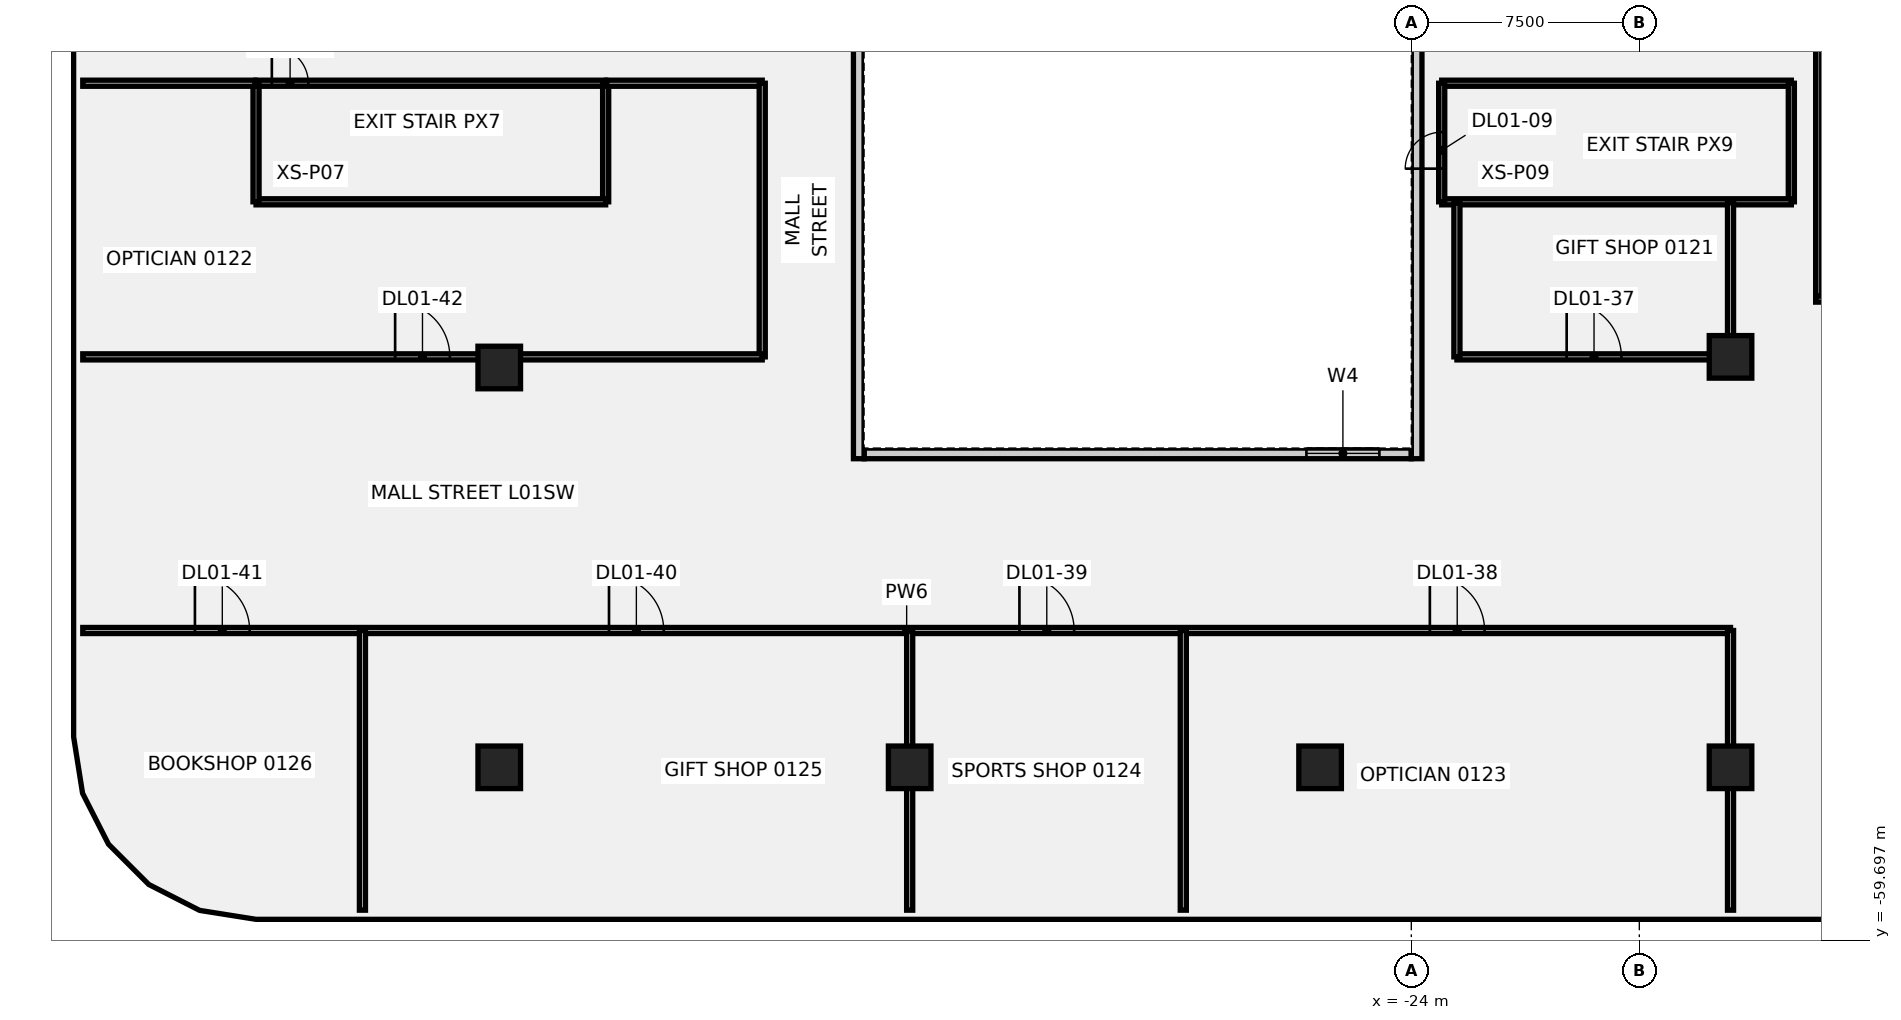
"""IFC4 building model, lengths in metres.
Left out: names, types, materials, properties, quantities, classifications, styles, units other than length and angle.
Written with IfcOpenShell. Run it as: python <this file> out.ifc"""

import sys

from ifc_helpers import new_model, si_unit, direction, frame, frame_2d, origin, origin_2d, place, context, subcontext, project, spatial, rectangle, extrude, element, fill, save


model = new_model("IFC4")
c1 = context("Model", 3, precision=1e-05, world=origin(), true_north=direction((0.0, 1.0)))
c2 = subcontext(c1, "Body", "Model", "MODEL_VIEW")
j1 = project(units=[si_unit("LENGTHUNIT", "METRE"), si_unit("PLANEANGLEUNIT", "RADIAN")], contexts=[c1])
p1 = place(None, origin())
s1 = spatial("IfcSite", under=j1, at=p1, CompositionType="ELEMENT")
p2 = place(p1, origin())
s2 = spatial("IfcBuilding", under=s1, at=p2, CompositionType="ELEMENT")
p3 = place(p2, frame((0.0, 0.0, 9.0)))
s3 = spatial("IfcBuildingStorey", under=s2, at=p3, CompositionType="ELEMENT", Elevation=9.0)
for number, where, z_axis, x_axis in (
    (1, (-54.0, -54.0, -0.5), (0.0, 0.0, 1.0), (1.0, 0.0, 0.0)),
    (2, (-54.0, -40.85, -0.5), (0.0, 0.0, 1.0), (1.0, 0.0, 0.0)),
    (3, (-40.5, -54.0, -0.5), (0.0, 0.0, 1.0), (1.0, 0.0, 0.0)),
    (4, (-27.0, -54.0, -0.5), (0.0, 0.0, 1.0), (1.0, 0.0, 0.0)),
    (5, (-13.5, -54.0, -0.5), (0.0, 0.0, 1.0), (1.0, 0.0, 0.0)),
    (6, (-13.5, -40.5, -0.5), (0.0, 0.0, 1.0), (1.0, 0.0, 0.0)),
):
    element("IfcColumn", number, at=place(p3, frame(where, z_axis=z_axis, x_axis=x_axis)), inside=s3, PredefinedType="COLUMN", context=c2, shape_type="SweptSolid", body=[
        extrude(rectangle(XDim=1.4, YDim=1.4, at=origin_2d()), origin(), (0.0, 0.0, 1.0), 6.0),
    ])
p4 = place(p3, frame((-62.0, -31.5, 0.0), z_axis=(0.0, 0.0, 1.0), x_axis=(1.0, 0.0, 0.0)))
e7 = element("IfcWall", 7, at=p4, inside=s3, PredefinedType="PARTITIONING", context=c2, shape_type="SweptSolid", body=[
    extrude(rectangle(XDim=11.5, YDim=0.2, at=frame_2d((5.75, 0.0))), origin(), (0.0, 0.0, 1.0), 5.5),
])
p5 = place(p4, frame((0.52, 0.0, 0.0)))
e8 = element("IfcOpeningElement", 8, at=p5, cuts=e7, PredefinedType="OPENING", context=c2, shape_type="SweptSolid", body=[
    extrude(rectangle(XDim=1.2, YDim=2.1, at=frame_2d((0.6, 1.05))), frame((0.0, 0.11, 0.0), z_axis=(0.0, -1.0, 0.0), x_axis=(1.0, 0.0, 0.0)), (0.0, 0.0, 1.0), 0.22),
])
p6 = place(p3, frame((-50.5, -35.4, 0.0), z_axis=(0.0, 0.0, 1.0), x_axis=(0.0, 1.0, 0.0)))
e9 = element("IfcWall", 9, at=p6, inside=s3, PredefinedType="PARTITIONING", context=c2, shape_type="SweptSolid", body=[
    extrude(rectangle(XDim=3.9, YDim=0.2, at=frame_2d((1.95, 0.0))), origin(), (0.0, 0.0, 1.0), 5.5),
])
p7 = place(p3, frame((-62.0, -35.4, 0.0), z_axis=(0.0, 0.0, 1.0), x_axis=(1.0, 0.0, 0.0)))
e10 = element("IfcWall", 10, at=p7, inside=s3, PredefinedType="PARTITIONING", context=c2, shape_type="SweptSolid", body=[
    extrude(rectangle(XDim=11.5, YDim=0.2, at=frame_2d((5.75, 0.0))), origin(), (0.0, 0.0, 1.0), 5.5),
])
p8 = place(p3, frame((-62.0, -35.4, 0.0), z_axis=(0.0, 0.0, 1.0), x_axis=(0.0, 1.0, 0.0)))
e11 = element("IfcWall", 11, at=p8, inside=s3, PredefinedType="PARTITIONING", context=c2, shape_type="SweptSolid", body=[
    extrude(rectangle(XDim=3.9, YDim=0.2, at=frame_2d((1.95, 0.0))), origin(), (0.0, 0.0, 1.0), 5.5),
])
p9 = place(p3, frame((-23.0, -31.5, 0.0), z_axis=(0.0, 0.0, 1.0), x_axis=(1.0, 0.0, 0.0)))
e12 = element("IfcWall", 12, at=p9, inside=s3, PredefinedType="PARTITIONING", context=c2, shape_type="SweptSolid", body=[
    extrude(rectangle(XDim=11.5, YDim=0.2, at=frame_2d((5.75, 0.0))), origin(), (0.0, 0.0, 1.0), 5.5),
])
p10 = place(p3, frame((-11.5, -35.4, 0.0), z_axis=(0.0, 0.0, 1.0), x_axis=(0.0, 1.0, 0.0)))
e13 = element("IfcWall", 13, at=p10, inside=s3, PredefinedType="PARTITIONING", context=c2, shape_type="SweptSolid", body=[
    extrude(rectangle(XDim=3.9, YDim=0.2, at=frame_2d((1.95, 0.0))), origin(), (0.0, 0.0, 1.0), 5.5),
])
p11 = place(p3, frame((-23.0, -35.4, 0.0), z_axis=(0.0, 0.0, 1.0), x_axis=(1.0, 0.0, 0.0)))
e14 = element("IfcWall", 14, at=p11, inside=s3, PredefinedType="PARTITIONING", context=c2, shape_type="SweptSolid", body=[
    extrude(rectangle(XDim=11.5, YDim=0.2, at=frame_2d((5.75, 0.0))), origin(), (0.0, 0.0, 1.0), 5.5),
])
p12 = place(p3, frame((-23.0, -35.4, 0.0), z_axis=(0.0, 0.0, 1.0), x_axis=(0.0, 1.0, 0.0)))
e15 = element("IfcWall", 15, at=p12, inside=s3, PredefinedType="PARTITIONING", context=c2, shape_type="SweptSolid", body=[
    extrude(rectangle(XDim=3.9, YDim=0.2, at=frame_2d((1.95, 0.0))), origin(), (0.0, 0.0, 1.0), 5.5),
])
p13 = place(p12, frame((1.09, 0.0, 0.0)))
e16 = element("IfcOpeningElement", 16, at=p13, cuts=e15, PredefinedType="OPENING", context=c2, shape_type="SweptSolid", body=[
    extrude(rectangle(XDim=1.2, YDim=2.1, at=frame_2d((0.6, 1.05))), frame((0.0, 0.11, 0.0), z_axis=(0.0, -1.0, 0.0), x_axis=(1.0, 0.0, 0.0)), (0.0, 0.0, 1.0), 0.22),
])
p14 = place(p3, frame((-67.699, -49.5, 0.0), z_axis=(0.0, 0.0, 1.0), x_axis=(1.0, 0.0, 0.0)))
e17 = element("IfcWall", 17, at=p14, inside=s3, PredefinedType="PARTITIONING", context=c2, shape_type="SweptSolid", body=[
    extrude(rectangle(XDim=54.199, YDim=0.2, at=frame_2d((27.1, 0.0))), origin(), (0.0, 0.0, 1.0), 5.5),
])
p15 = place(p14, frame((44.309, 0.0, 0.0)))
e18 = element("IfcOpeningElement", 18, at=p15, cuts=e17, PredefinedType="OPENING", context=c2, shape_type="SweptSolid", body=[
    extrude(rectangle(XDim=1.8, YDim=2.1, at=frame_2d((0.9, 1.05))), frame((0.0, 0.11, 0.0), z_axis=(0.0, -1.0, 0.0), x_axis=(1.0, 0.0, 0.0)), (0.0, 0.0, 1.0), 0.22),
])
p16 = place(p14, frame((30.809, 0.0, 0.0)))
e19 = element("IfcOpeningElement", 19, at=p16, cuts=e17, PredefinedType="OPENING", context=c2, shape_type="SweptSolid", body=[
    extrude(rectangle(XDim=1.8, YDim=2.1, at=frame_2d((0.9, 1.05))), frame((0.0, 0.11, 0.0), z_axis=(0.0, -1.0, 0.0), x_axis=(1.0, 0.0, 0.0)), (0.0, 0.0, 1.0), 0.22),
])
p17 = place(p14, frame((17.309, 0.0, 0.0)))
e20 = element("IfcOpeningElement", 20, at=p17, cuts=e17, PredefinedType="OPENING", context=c2, shape_type="SweptSolid", body=[
    extrude(rectangle(XDim=1.8, YDim=2.1, at=frame_2d((0.9, 1.05))), frame((0.0, 0.11, 0.0), z_axis=(0.0, -1.0, 0.0), x_axis=(1.0, 0.0, 0.0)), (0.0, 0.0, 1.0), 0.22),
])
p18 = place(p14, frame((3.689, 0.0, 0.0)))
e21 = element("IfcOpeningElement", 21, at=p18, cuts=e17, PredefinedType="OPENING", context=c2, shape_type="SweptSolid", body=[
    extrude(rectangle(XDim=1.8, YDim=2.1, at=frame_2d((0.9, 1.05))), frame((0.0, 0.11, 0.0), z_axis=(0.0, -1.0, 0.0), x_axis=(1.0, 0.0, 0.0)), (0.0, 0.0, 1.0), 0.22),
])
p19 = place(p3, frame((-50.47, -31.5, 0.0), z_axis=(0.0, 0.0, 1.0), x_axis=(1.0, 0.0, 0.0)))
e22 = element("IfcWall", 22, at=p19, inside=s3, PredefinedType="PARTITIONING", context=c2, shape_type="SweptSolid", body=[
    extrude(rectangle(XDim=5.12, YDim=0.2, at=frame_2d((2.56, 0.0))), origin(), (0.0, 0.0, 1.0), 5.5),
])
p20 = place(p3, frame((-45.35, -40.5, 0.0), z_axis=(0.0, 0.0, 1.0), x_axis=(0.0, 1.0, 0.0)))
e23 = element("IfcWall", 23, at=p20, inside=s3, PredefinedType="PARTITIONING", context=c2, shape_type="SweptSolid", body=[
    extrude(rectangle(XDim=9.0, YDim=0.2, at=frame_2d((4.5, 0.0))), origin(), (0.0, 0.0, 1.0), 5.5),
])
p21 = place(p3, frame((-67.699, -40.5, 0.0), z_axis=(0.0, 0.0, 1.0), x_axis=(1.0, 0.0, 0.0)))
e24 = element("IfcWall", 24, at=p21, inside=s3, PredefinedType="PARTITIONING", context=c2, shape_type="SweptSolid", body=[
    extrude(rectangle(XDim=22.349, YDim=0.2, at=frame_2d((11.174, 0.0))), origin(), (0.0, 0.0, 1.0), 5.5),
])
p22 = place(p21, frame((10.274, 0.0, 0.0)))
e25 = element("IfcOpeningElement", 25, at=p22, cuts=e24, PredefinedType="OPENING", context=c2, shape_type="SweptSolid", body=[
    extrude(rectangle(XDim=1.8, YDim=2.1, at=frame_2d((0.9, 1.05))), frame((0.0, 0.11, 0.0), z_axis=(0.0, -1.0, 0.0), x_axis=(1.0, 0.0, 0.0)), (0.0, 0.0, 1.0), 0.22),
])
p23 = place(p3, frame((-67.699, -31.5, 0.0), z_axis=(0.0, 0.0, 1.0), x_axis=(1.0, 0.0, 0.0)))
e26 = element("IfcWall", 26, at=p23, inside=s3, PredefinedType="PARTITIONING", context=c2, shape_type="SweptSolid", body=[
    extrude(rectangle(XDim=5.669, YDim=0.2, at=frame_2d((2.834, 0.0))), origin(), (0.0, 0.0, 1.0), 5.5),
])
for number, where, z_axis, x_axis in (
    (27, (-58.5, -58.699, 0.0), (0.0, 0.0, 1.0), (0.0, 1.0, 0.0)),
    (28, (-40.5, -58.699, 0.0), (0.0, 0.0, 1.0), (0.0, 1.0, 0.0)),
    (29, (-31.5, -58.699, 0.0), (0.0, 0.0, 1.0), (0.0, 1.0, 0.0)),
    (30, (-13.5, -58.699, 0.0), (0.0, 0.0, 1.0), (0.0, 1.0, 0.0)),
):
    element("IfcWall", number, at=place(p3, frame(where, z_axis=z_axis, x_axis=x_axis)), inside=s3, PredefinedType="PARTITIONING", context=c2, shape_type="SweptSolid", body=[
        extrude(rectangle(XDim=9.199, YDim=0.2, at=frame_2d((4.6, 0.0))), origin(), (0.0, 0.0, 1.0), 5.5),
    ])
p24 = place(p3, frame((-13.5, -40.5, 0.0), z_axis=(0.0, 0.0, 1.0), x_axis=(0.0, 1.0, 0.0)))
e31 = element("IfcWall", 31, at=p24, inside=s3, PredefinedType="PARTITIONING", context=c2, shape_type="SweptSolid", body=[
    extrude(rectangle(XDim=5.07, YDim=0.2, at=frame_2d((2.535, 0.0))), origin(), (0.0, 0.0, 1.0), 5.5),
])
p25 = place(p3, frame((-22.5, -40.5, 0.0), z_axis=(0.0, 0.0, 1.0), x_axis=(1.0, 0.0, 0.0)))
e32 = element("IfcWall", 32, at=p25, inside=s3, PredefinedType="PARTITIONING", context=c2, shape_type="SweptSolid", body=[
    extrude(rectangle(XDim=9.0, YDim=0.2, at=frame_2d((4.5, 0.0))), origin(), (0.0, 0.0, 1.0), 5.5),
])
p26 = place(p25, frame((3.61, 0.0, 0.0)))
e33 = element("IfcOpeningElement", 33, at=p26, cuts=e32, PredefinedType="OPENING", context=c2, shape_type="SweptSolid", body=[
    extrude(rectangle(XDim=1.8, YDim=2.1, at=frame_2d((0.9, 1.05))), frame((0.0, 0.11, 0.0), z_axis=(0.0, -1.0, 0.0), x_axis=(1.0, 0.0, 0.0)), (0.0, 0.0, 1.0), 0.22),
])
p27 = place(p3, frame((-22.5, -40.5, 0.0), z_axis=(0.0, 0.0, 1.0), x_axis=(0.0, 1.0, 0.0)))
e34 = element("IfcWall", 34, at=p27, inside=s3, PredefinedType="PARTITIONING", context=c2, shape_type="SweptSolid", body=[
    extrude(rectangle(XDim=5.07, YDim=0.2, at=frame_2d((2.535, 0.0))), origin(), (0.0, 0.0, 1.0), 5.5),
])
p28 = place(p3, frame((-10.6, -28.8, 0.0), z_axis=(0.0, 0.0, 1.0), x_axis=(0.0, -1.0, 0.0)))
e35 = element("IfcWall", 35, at=p28, inside=s3, PredefinedType="SOLIDWALL", context=c2, shape_type="SweptSolid", body=[
    extrude(rectangle(XDim=9.7, YDim=0.2, at=frame_2d((4.85, 0.0))), origin(), (0.0, 0.0, 1.0), 5.5),
])
p29 = place(p3, frame((-10.7, -38.6, 0.0), z_axis=(0.0, 0.0, 1.0), x_axis=(1.0, 0.0, 0.0)))
e36 = element("IfcWall", 36, at=p29, inside=s3, PredefinedType="SOLIDWALL", context=c2, shape_type="SweptSolid", body=[
    extrude(rectangle(XDim=4.3, YDim=0.2, at=frame_2d((2.15, 0.0))), origin(), (0.0, 0.0, 1.0), 5.5),
])
p30 = place(p3, frame((-42.0, -43.675, 0.0), z_axis=(0.0, 0.0, 1.0), x_axis=(1.0, 0.0, 0.0)))
e37 = element("IfcWall", 37, at=p30, inside=s3, PredefinedType="SOLIDWALL", context=c2, shape_type="SweptSolid", body=[
    extrude(rectangle(XDim=18.0, YDim=0.35, at=frame_2d((9.0, 0.0))), origin(), (0.0, 0.0, 1.0), 5.5),
])
p31 = place(p30, frame((14.55, 0.0, 1.0)))
e38 = element("IfcOpeningElement", 38, at=p31, cuts=e37, PredefinedType="OPENING", context=c2, shape_type="SweptSolid", body=[
    extrude(rectangle(XDim=2.4, YDim=1.8, at=frame_2d((1.2, 0.9))), frame((0.0, 0.185, 0.0), z_axis=(0.0, -1.0, 0.0), x_axis=(1.0, 0.0, 0.0)), (0.0, 0.0, 1.0), 0.37),
])
p32 = place(p3, frame((-42.175, -43.85, 0.0), z_axis=(0.0, 0.0, 1.0), x_axis=(0.0, 1.0, 0.0)))
e39 = element("IfcWall", 39, at=p32, inside=s3, PredefinedType="SOLIDWALL", context=c2, shape_type="SweptSolid", body=[
    extrude(rectangle(XDim=27.4, YDim=0.35, at=frame_2d((13.7, 0.0))), origin(), (0.0, 0.0, 1.0), 5.5),
])
p33 = place(p32, frame((14.9, 0.0, 1.0)))
e40 = element("IfcOpeningElement", 40, at=p33, cuts=e39, PredefinedType="OPENING", context=c2, shape_type="SweptSolid", body=[
    extrude(rectangle(XDim=2.4, YDim=1.8, at=frame_2d((1.2, 0.9))), frame((0.0, 0.185, 0.0), z_axis=(0.0, -1.0, 0.0), x_axis=(1.0, 0.0, 0.0)), (0.0, 0.0, 1.0), 0.37),
])
p34 = place(p3, frame((-23.825, -43.85, 0.0), z_axis=(0.0, 0.0, 1.0), x_axis=(0.0, 1.0, 0.0)))
e41 = element("IfcWall", 41, at=p34, inside=s3, PredefinedType="SOLIDWALL", context=c2, shape_type="SweptSolid", body=[
    extrude(rectangle(XDim=27.4, YDim=0.35, at=frame_2d((13.7, 0.0))), origin(), (0.0, 0.0, 1.0), 5.5),
])
p35 = place(p34, frame((14.9, 0.0, 1.0)))
e42 = element("IfcOpeningElement", 42, at=p35, cuts=e41, PredefinedType="OPENING", context=c2, shape_type="SweptSolid", body=[
    extrude(rectangle(XDim=2.4, YDim=1.8, at=frame_2d((1.2, 0.9))), frame((0.0, 0.185, 0.0), z_axis=(0.0, -1.0, 0.0), x_axis=(1.0, 0.0, 0.0)), (0.0, 0.0, 1.0), 0.37),
])
p36 = place(p5, origin())
e43 = element("IfcDoor", 43, at=p36, inside=s3, OperationType="SINGLE_SWING_LEFT", PredefinedType="DOOR", context=c2, shape_type="SweptSolid", body=[
    extrude(rectangle(XDim=1.2, YDim=2.1, at=frame_2d((0.6, 1.05))), frame((0.0, 0.025, 0.0), z_axis=(0.0, -1.0, 0.0), x_axis=(1.0, 0.0, 0.0)), (0.0, 0.0, 1.0), 0.05),
])
fill(e8, e43)
p37 = place(p13, origin())
e44 = element("IfcDoor", 44, at=p37, inside=s3, OperationType="SINGLE_SWING_LEFT", PredefinedType="DOOR", context=c2, shape_type="SweptSolid", body=[
    extrude(rectangle(XDim=1.2, YDim=2.1, at=frame_2d((0.6, 1.05))), frame((0.0, 0.025, 0.0), z_axis=(0.0, -1.0, 0.0), x_axis=(1.0, 0.0, 0.0)), (0.0, 0.0, 1.0), 0.05),
])
fill(e16, e44)
p38 = place(p26, origin())
e45 = element("IfcDoor", 45, at=p38, inside=s3, OperationType="SINGLE_SWING_LEFT", PredefinedType="DOOR", context=c2, shape_type="SweptSolid", body=[
    extrude(rectangle(XDim=1.8, YDim=2.1, at=frame_2d((0.9, 1.05))), frame((0.0, 0.025, 0.0), z_axis=(0.0, -1.0, 0.0), x_axis=(1.0, 0.0, 0.0)), (0.0, 0.0, 1.0), 0.05),
])
fill(e33, e45)
p39 = place(p15, origin())
e46 = element("IfcDoor", 46, at=p39, inside=s3, OperationType="SINGLE_SWING_RIGHT", PredefinedType="DOOR", context=c2, shape_type="SweptSolid", body=[
    extrude(rectangle(XDim=1.8, YDim=2.1, at=frame_2d((0.9, 1.05))), frame((0.0, 0.025, 0.0), z_axis=(0.0, -1.0, 0.0), x_axis=(1.0, 0.0, 0.0)), (0.0, 0.0, 1.0), 0.05),
])
fill(e18, e46)
p40 = place(p16, origin())
e47 = element("IfcDoor", 47, at=p40, inside=s3, OperationType="SINGLE_SWING_LEFT", PredefinedType="DOOR", context=c2, shape_type="SweptSolid", body=[
    extrude(rectangle(XDim=1.8, YDim=2.1, at=frame_2d((0.9, 1.05))), frame((0.0, 0.025, 0.0), z_axis=(0.0, -1.0, 0.0), x_axis=(1.0, 0.0, 0.0)), (0.0, 0.0, 1.0), 0.05),
])
fill(e19, e47)
p41 = place(p17, origin())
e48 = element("IfcDoor", 48, at=p41, inside=s3, OperationType="SINGLE_SWING_RIGHT", PredefinedType="DOOR", context=c2, shape_type="SweptSolid", body=[
    extrude(rectangle(XDim=1.8, YDim=2.1, at=frame_2d((0.9, 1.05))), frame((0.0, 0.025, 0.0), z_axis=(0.0, -1.0, 0.0), x_axis=(1.0, 0.0, 0.0)), (0.0, 0.0, 1.0), 0.05),
])
fill(e20, e48)
p42 = place(p18, origin())
e49 = element("IfcDoor", 49, at=p42, inside=s3, OperationType="SINGLE_SWING_LEFT", PredefinedType="DOOR", context=c2, shape_type="SweptSolid", body=[
    extrude(rectangle(XDim=1.8, YDim=2.1, at=frame_2d((0.9, 1.05))), frame((0.0, 0.025, 0.0), z_axis=(0.0, -1.0, 0.0), x_axis=(1.0, 0.0, 0.0)), (0.0, 0.0, 1.0), 0.05),
])
fill(e21, e49)
p43 = place(p22, origin())
e50 = element("IfcDoor", 50, at=p43, inside=s3, OperationType="SINGLE_SWING_RIGHT", PredefinedType="DOOR", context=c2, shape_type="SweptSolid", body=[
    extrude(rectangle(XDim=1.8, YDim=2.1, at=frame_2d((0.9, 1.05))), frame((0.0, 0.025, 0.0), z_axis=(0.0, -1.0, 0.0), x_axis=(1.0, 0.0, 0.0)), (0.0, 0.0, 1.0), 0.05),
])
fill(e25, e50)
p44 = place(p31, origin())
e51 = element("IfcWindow", 51, at=p44, inside=s3, PartitioningType="SINGLE_PANEL", PredefinedType="WINDOW", context=c2, shape_type="SweptSolid", body=[
    extrude(rectangle(XDim=2.4, YDim=1.8, at=frame_2d((1.2, 0.9))), frame((0.0, 0.03, 0.0), z_axis=(0.0, -1.0, 0.0), x_axis=(1.0, 0.0, 0.0)), (0.0, 0.0, 1.0), 0.06),
])
fill(e38, e51)
save(model, sys.argv[1])
